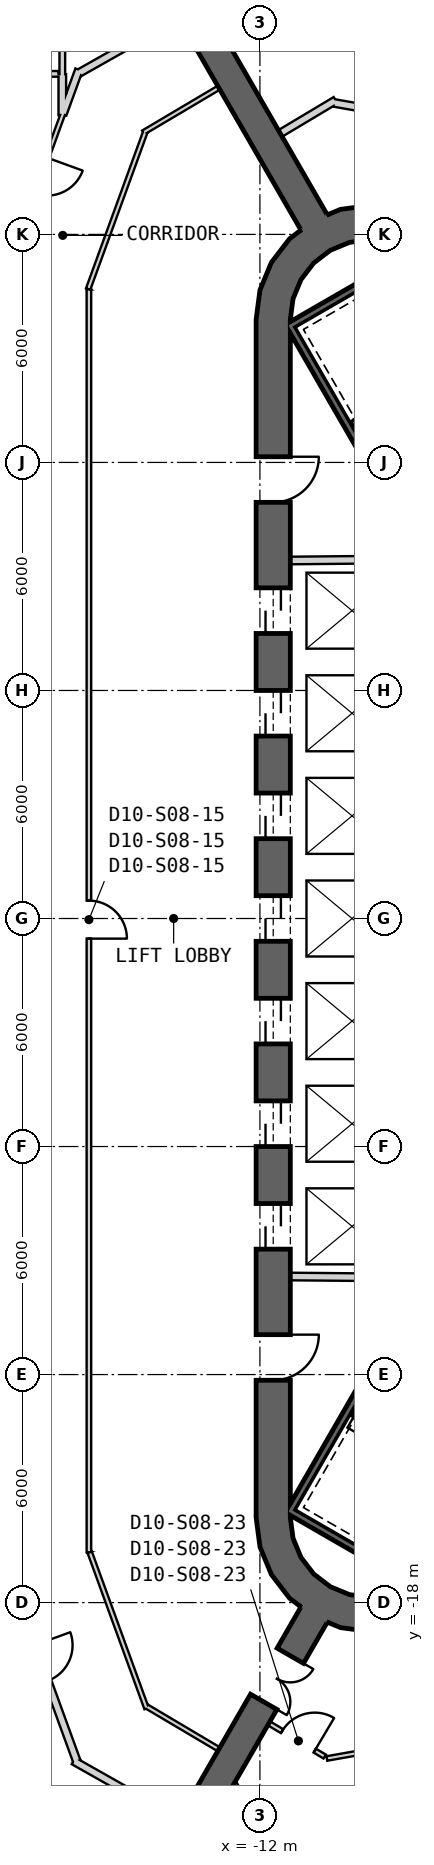
"""IFC4 building model, lengths in metres.
Left out: names, types, materials, properties, quantities, classifications, styles, units other than length and angle.
Written with IfcOpenShell. Run it as: python <this file> out.ifc"""

import sys

from ifc_helpers import new_model, si_unit, direction, frame, frame_2d, origin, place, context, subcontext, project, spatial, polyline, rectangle, outline, extrude, element, fill, save


model = new_model("IFC4")
c1 = context("Model", 3, precision=1e-05, world=origin(), true_north=direction((0.0, 1.0)))
c2 = subcontext(c1, "Body", "Model", "MODEL_VIEW")
j1 = project(units=[si_unit("LENGTHUNIT", "METRE"), si_unit("PLANEANGLEUNIT", "RADIAN")], contexts=[c1])
p1 = place(None, origin())
s1 = spatial("IfcSite", under=j1, at=p1, CompositionType="ELEMENT")
p2 = place(p1, origin())
s2 = spatial("IfcBuilding", under=s1, at=p2, CompositionType="ELEMENT")
p3 = place(p2, frame((0.0, 0.0, 143.9)))
s3 = spatial("IfcBuildingStorey", under=s2, at=p3, CompositionType="ELEMENT", Elevation=143.9)
p4 = place(p3, frame((-11.65, 15.762, 0.0), z_axis=(0.0, 0.0, 1.0), x_axis=(0.0, -1.0, 0.0)))
e1 = element("IfcWall", 1, at=p4, inside=s3, PredefinedType="SHEAR", context=c2, shape_type="SweptSolid", body=[
    extrude(rectangle(XDim=31.523, YDim=0.9, at=frame_2d((15.762, 0.0))), origin(), (0.0, 0.0, 1.0), 4.1),
])
p5 = place(p4, frame((7.062, 0.0, 0.0)))
e2 = element("IfcOpeningElement", 2, at=p5, cuts=e1, PredefinedType="OPENING", context=c2, shape_type="SweptSolid", body=[
    extrude(rectangle(XDim=1.2, YDim=2.4, at=frame_2d((0.6, 1.2))), frame((0.0, 0.46, 0.0), z_axis=(0.0, -1.0, 0.0), x_axis=(1.0, 0.0, 0.0)), (0.0, 0.0, 1.0), 0.92),
])
p6 = place(p4, frame((9.762, 0.0, 0.0)))
e3 = element("IfcOpeningElement", 3, at=p6, cuts=e1, PredefinedType="OPENING", context=c2, shape_type="SweptSolid", body=[
    extrude(rectangle(XDim=1.2, YDim=2.4, at=frame_2d((0.6, 1.2))), frame((0.0, 0.46, 0.0), z_axis=(0.0, -1.0, 0.0), x_axis=(1.0, 0.0, 0.0)), (0.0, 0.0, 1.0), 0.92),
])
p7 = place(p4, frame((12.462, 0.0, 0.0)))
e4 = element("IfcOpeningElement", 4, at=p7, cuts=e1, PredefinedType="OPENING", context=c2, shape_type="SweptSolid", body=[
    extrude(rectangle(XDim=1.2, YDim=2.4, at=frame_2d((0.6, 1.2))), frame((0.0, 0.46, 0.0), z_axis=(0.0, -1.0, 0.0), x_axis=(1.0, 0.0, 0.0)), (0.0, 0.0, 1.0), 0.92),
])
p8 = place(p4, frame((15.162, 0.0, 0.0)))
e5 = element("IfcOpeningElement", 5, at=p8, cuts=e1, PredefinedType="OPENING", context=c2, shape_type="SweptSolid", body=[
    extrude(rectangle(XDim=1.2, YDim=2.4, at=frame_2d((0.6, 1.2))), frame((0.0, 0.46, 0.0), z_axis=(0.0, -1.0, 0.0), x_axis=(1.0, 0.0, 0.0)), (0.0, 0.0, 1.0), 0.92),
])
p9 = place(p4, frame((17.862, 0.0, 0.0)))
e6 = element("IfcOpeningElement", 6, at=p9, cuts=e1, PredefinedType="OPENING", context=c2, shape_type="SweptSolid", body=[
    extrude(rectangle(XDim=1.2, YDim=2.4, at=frame_2d((0.6, 1.2))), frame((0.0, 0.46, 0.0), z_axis=(0.0, -1.0, 0.0), x_axis=(1.0, 0.0, 0.0)), (0.0, 0.0, 1.0), 0.92),
])
p10 = place(p4, frame((20.562, 0.0, 0.0)))
e7 = element("IfcOpeningElement", 7, at=p10, cuts=e1, PredefinedType="OPENING", context=c2, shape_type="SweptSolid", body=[
    extrude(rectangle(XDim=1.2, YDim=2.4, at=frame_2d((0.6, 1.2))), frame((0.0, 0.46, 0.0), z_axis=(0.0, -1.0, 0.0), x_axis=(1.0, 0.0, 0.0)), (0.0, 0.0, 1.0), 0.92),
])
p11 = place(p4, frame((23.262, 0.0, 0.0)))
e8 = element("IfcOpeningElement", 8, at=p11, cuts=e1, PredefinedType="OPENING", context=c2, shape_type="SweptSolid", body=[
    extrude(rectangle(XDim=1.2, YDim=2.4, at=frame_2d((0.6, 1.2))), frame((0.0, 0.46, 0.0), z_axis=(0.0, -1.0, 0.0), x_axis=(1.0, 0.0, 0.0)), (0.0, 0.0, 1.0), 0.92),
])
p12 = place(p4, frame((3.612, 0.0, 0.0)))
e9 = element("IfcOpeningElement", 9, at=p12, cuts=e1, PredefinedType="OPENING", context=c2, shape_type="SweptSolid", body=[
    extrude(rectangle(XDim=1.2, YDim=2.4, at=frame_2d((0.6, 1.2))), frame((0.0, 0.46, 0.0), z_axis=(0.0, -1.0, 0.0), x_axis=(1.0, 0.0, 0.0)), (0.0, 0.0, 1.0), 0.92),
])
p13 = place(p4, frame((26.712, 0.0, 0.0)))
e10 = element("IfcOpeningElement", 10, at=p13, cuts=e1, PredefinedType="OPENING", context=c2, shape_type="SweptSolid", body=[
    extrude(rectangle(XDim=1.2, YDim=2.4, at=frame_2d((0.6, 1.2))), frame((0.0, 0.46, 0.0), z_axis=(0.0, -1.0, 0.0), x_axis=(1.0, 0.0, 0.0)), (0.0, 0.0, 1.0), 0.92),
])
p14 = place(p3, origin())
e11 = element("IfcWall", 11, at=p14, inside=s3, PredefinedType="SHEAR", context=c2, shape_type="SweptSolid", body=[
    extrude(outline(polyline([(-7.6, 18.36), (-8.323, 18.659), (-9.1, 18.762), (-9.876, 18.659), (-10.6, 18.36), (-11.221, 17.883), (-11.698, 17.262), (-11.998, 16.538), (-12.1, 15.762), (-11.2, 15.762), (-11.128, 16.305), (-10.919, 16.812), (-10.585, 17.247), (-10.15, 17.58), (-9.644, 17.79), (-9.1, 17.862), (-8.556, 17.79), (-8.05, 17.58), (-7.6, 18.36)])), origin(), (0.0, 0.0, 1.0), 4.1),
])
p15 = place(p3, origin())
e12 = element("IfcWall", 12, at=p15, inside=s3, PredefinedType="SHEAR", context=c2, shape_type="SweptSolid", body=[
    extrude(outline(polyline([(-12.1, -15.762), (-11.998, -16.538), (-11.698, -17.262), (-11.221, -17.883), (-10.6, -18.36), (-9.876, -18.659), (-9.1, -18.762), (-8.323, -18.659), (-7.6, -18.36), (-8.05, -17.58), (-8.556, -17.79), (-9.1, -17.862), (-9.644, -17.79), (-10.15, -17.58), (-10.585, -17.247), (-10.919, -16.812), (-11.128, -16.305), (-11.2, -15.762), (-12.1, -15.762)])), origin(), (0.0, 0.0, 1.0), 4.1),
])
p16 = place(p3, frame((-10.575, 18.316, 0.0), z_axis=(0.0, 0.0, 1.0), x_axis=(-0.500002326941, 0.86602406032, 0.0)))
e13 = element("IfcWall", 13, at=p16, inside=s3, PredefinedType="SHEAR", context=c2, shape_type="SweptSolid", body=[
    extrude(rectangle(XDim=12.384, YDim=0.8, at=frame_2d((6.192, 0.0))), origin(), (0.0, 0.0, 1.0), 4.1),
])
p17 = place(p16, frame((6.95, 0.0, 0.0)))
e14 = element("IfcOpeningElement", 14, at=p17, cuts=e13, PredefinedType="OPENING", context=c2, shape_type="SweptSolid", body=[
    extrude(rectangle(XDim=1.4, YDim=2.4, at=frame_2d((0.7, 1.2))), frame((0.0, 0.41, 0.0), z_axis=(0.0, -1.0, 0.0), x_axis=(1.0, 0.0, 0.0)), (0.0, 0.0, 1.0), 0.82),
])
p18 = place(p3, frame((-10.575, -18.316, 0.0), z_axis=(0.0, 0.0, 1.0), x_axis=(-0.500002326941, -0.86602406032, 0.0)))
e15 = element("IfcWall", 15, at=p18, inside=s3, PredefinedType="SHEAR", context=c2, shape_type="SweptSolid", body=[
    extrude(rectangle(XDim=12.384, YDim=0.8, at=frame_2d((6.192, 0.0))), origin(), (0.0, 0.0, 1.0), 4.1),
])
p19 = place(p18, frame((1.25, 0.0, 0.0)))
e16 = element("IfcOpeningElement", 16, at=p19, cuts=e15, PredefinedType="OPENING", context=c2, shape_type="SweptSolid", body=[
    extrude(rectangle(XDim=1.4, YDim=2.4, at=frame_2d((0.7, 1.2))), frame((0.0, 0.41, 0.0), z_axis=(0.0, -1.0, 0.0), x_axis=(1.0, 0.0, 0.0)), (0.0, 0.0, 1.0), 0.82),
])
p20 = place(p3, frame((-11.2, 9.42, 0.0), z_axis=(0.0, 0.0, 1.0), x_axis=(0.999957167047, 0.009255488683, 0.0)))
e17 = element("IfcWall", 17, at=p20, inside=s3, PredefinedType="PLUMBINGWALL", context=c2, shape_type="SweptSolid", body=[
    extrude(rectangle(XDim=3.35, YDim=0.2, at=frame_2d((1.675, 0.0))), origin(), (0.0, 0.0, 1.0), 3.8),
])
p21 = place(p3, frame((-8.05, -9.449, 0.0), z_axis=(0.0, 0.0, 1.0), x_axis=(-0.999957467379, 0.009222983926, 0.0)))
e18 = element("IfcWall", 18, at=p21, inside=s3, PredefinedType="PLUMBINGWALL", context=c2, shape_type="SweptSolid", body=[
    extrude(rectangle(XDim=3.15, YDim=0.2, at=frame_2d((1.575, 0.0))), origin(), (0.0, 0.0, 1.0), 3.8),
])
p22 = place(p3, frame((-11.245, 15.678, -0.3), z_axis=(0.0, 0.0, 1.0), x_axis=(0.499977274689, -0.866038523851, 0.0)))
e19 = element("IfcWall", 19, at=p22, inside=s3, PredefinedType="SHEAR", context=c2, shape_type="SweptSolid", body=[
    extrude(rectangle(XDim=8.1, YDim=0.2, at=frame_2d((4.05, 0.0))), origin(), (0.0, 0.0, 1.0), 4.1),
])
for number, where, z_axis, x_axis in (
    (20, (-7.818, 17.541, -0.3), (0.0, 0.0, 1.0), (-0.866, -0.5, 0.0)),
    (21, (-11.282, -15.541, -0.3), (0.0, 0.0, 1.0), (0.866, -0.5, 0.0)),
):
    element("IfcWall", number, at=place(p3, frame(where, z_axis=z_axis, x_axis=x_axis)), inside=s3, PredefinedType="SHEAR", context=c2, shape_type="SweptSolid", body=[
        extrude(rectangle(XDim=3.8, YDim=0.2, at=frame_2d((1.9, 0.0))), origin(), (0.0, 0.0, 1.0), 4.1),
    ])
p23 = place(p3, frame((-7.196, -8.663, -0.3), z_axis=(0.0, 0.0, 1.0), x_axis=(-0.499997992926, -0.866026562566, 0.0)))
e22 = element("IfcWall", 22, at=p23, inside=s3, PredefinedType="SHEAR", context=c2, shape_type="SweptSolid", body=[
    extrude(rectangle(XDim=7.9, YDim=0.2, at=frame_2d((3.95, 0.0))), origin(), (0.0, 0.0, 1.0), 4.1),
])
p24 = place(p3, frame((-13.082, 21.859, 0.0), z_axis=(0.0, 0.0, 1.0), x_axis=(-0.860286384661, -0.509811079095, 0.0)))
e23 = element("IfcWall", 23, at=p24, inside=s3, PredefinedType="PARTITIONING", context=c2, shape_type="SweptSolid", body=[
    extrude(rectangle(XDim=2.311, YDim=0.12, at=frame_2d((1.155, 0.0))), origin(), (0.0, 0.0, 1.0), 3.8),
])
p25 = place(p3, frame((-15.017, 20.692, 0.0), z_axis=(0.0, 0.0, 1.0), x_axis=(-0.342028368186, -0.939689627141, 0.0)))
e24 = element("IfcWall", 24, at=p25, inside=s3, PredefinedType="PARTITIONING", context=c2, shape_type="SweptSolid", body=[
    extrude(rectangle(XDim=4.397, YDim=0.12, at=frame_2d((2.198, 0.0))), origin(), (0.0, 0.0, 1.0), 2.88),
])
p26 = place(p3, frame((-16.5, 16.557, 0.0), z_axis=(0.0, 0.0, 1.0), x_axis=(0.0, -1.0, 0.0)))
e25 = element("IfcWall", 25, at=p26, inside=s3, PredefinedType="PARTITIONING", context=c2, shape_type="SweptSolid", body=[
    extrude(rectangle(XDim=33.234, YDim=0.12, at=frame_2d((16.617, 0.0))), origin(), (0.0, 0.0, 1.0), 2.98),
])
p27 = place(p26, frame((16.087, 0.0, 0.0)))
e26 = element("IfcOpeningElement", 26, at=p27, cuts=e25, PredefinedType="OPENING", context=c2, shape_type="SweptSolid", body=[
    extrude(rectangle(XDim=1.0, YDim=2.1, at=frame_2d((0.5, 1.05))), frame((0.0, 0.07, 0.0), z_axis=(0.0, -1.0, 0.0), x_axis=(1.0, 0.0, 0.0)), (0.0, 0.0, 1.0), 0.14),
])
p28 = place(p3, frame((-16.479, -16.673, 0.0), z_axis=(0.0, 0.0, 1.0), x_axis=(0.342025144217, -0.939690800595, 0.0)))
e27 = element("IfcWall", 27, at=p28, inside=s3, PredefinedType="PARTITIONING", context=c2, shape_type="SweptSolid", body=[
    extrude(rectangle(XDim=4.378, YDim=0.12, at=frame_2d((2.189, 0.0))), origin(), (0.0, 0.0, 1.0), 2.88),
])
p29 = place(p3, frame((-14.983, -20.732, 0.0), z_axis=(0.0, 0.0, 1.0), x_axis=(0.860268204019, -0.509841756973, 0.0)))
e28 = element("IfcWall", 28, at=p29, inside=s3, PredefinedType="PARTITIONING", context=c2, shape_type="SweptSolid", body=[
    extrude(rectangle(XDim=2.21, YDim=0.12, at=frame_2d((1.105, 0.0))), origin(), (0.0, 0.0, 1.0), 3.8),
])
p30 = place(p3, frame((-16.903, -22.166, 0.0), z_axis=(0.0, 0.0, 1.0), x_axis=(0.870335069356, -0.492460015686, 0.0)))
e29 = element("IfcWall", 29, at=p30, inside=s3, PredefinedType="PARTITIONING", context=c2, shape_type="SweptSolid", body=[
    extrude(rectangle(XDim=3.156, YDim=0.2, at=frame_2d((1.578, 0.0))), origin(), (0.0, 0.0, 1.0), 2.88),
])
p31 = place(p3, frame((-18.734, -16.911, 0.0), z_axis=(0.0, 0.0, 1.0), x_axis=(0.342022840992, -0.939691638911, 0.0)))
e30 = element("IfcWall", 30, at=p31, inside=s3, PredefinedType="PARTITIONING", context=c2, shape_type="SweptSolid", body=[
    extrude(rectangle(XDim=5.605, YDim=0.2, at=frame_2d((2.802, 0.0))), origin(), (0.0, 0.0, 1.0), 2.88),
])
p32 = place(p31, frame((2.352, 0.0, 0.0)))
e31 = element("IfcOpeningElement", 31, at=p32, cuts=e30, PredefinedType="OPENING", context=c2, shape_type="SweptSolid", body=[
    extrude(rectangle(XDim=1.0, YDim=2.1, at=frame_2d((0.5, 1.05))), frame((0.0, 0.11, 0.0), z_axis=(0.0, -1.0, 0.0), x_axis=(1.0, 0.0, 0.0)), (0.0, 0.0, 1.0), 0.22),
])
p33 = place(p3, frame((-16.76, 22.333, 0.0), z_axis=(0.0, 0.0, 1.0), x_axis=(-0.342041387985, -0.93968488809, 0.0)))
e32 = element("IfcWall", 32, at=p33, inside=s3, PredefinedType="PARTITIONING", context=c2, shape_type="SweptSolid", body=[
    extrude(rectangle(XDim=1.248, YDim=0.2, at=frame_2d((0.624, 0.0))), origin(), (0.0, 0.0, 1.0), 2.88),
])
p34 = place(p3, frame((-14.156, 23.719, 0.0), z_axis=(0.0, 0.0, 1.0), x_axis=(-0.870320915518, -0.492485029226, 0.0)))
e33 = element("IfcWall", 33, at=p34, inside=s3, PredefinedType="PARTITIONING", context=c2, shape_type="SweptSolid", body=[
    extrude(rectangle(XDim=2.99, YDim=0.2, at=frame_2d((1.495, 0.0))), origin(), (0.0, 0.0, 1.0), 2.88),
])
p35 = place(p3, frame((-17.188, 21.16, 0.0), z_axis=(0.0, 0.0, 1.0), x_axis=(-0.342046352126, -0.939683081149, 0.0)))
e34 = element("IfcWall", 34, at=p35, inside=s3, PredefinedType="PARTITIONING", context=c2, shape_type="SweptSolid", body=[
    extrude(rectangle(XDim=3.425, YDim=0.12, at=frame_2d((1.713, 0.0))), origin(), (0.0, 0.0, 1.0), 2.98),
])
p36 = place(p35, frame((1.213, 0.0, 0.0)))
e35 = element("IfcOpeningElement", 35, at=p36, cuts=e34, PredefinedType="OPENING", context=c2, shape_type="SweptSolid", body=[
    extrude(rectangle(XDim=1.0, YDim=2.1, at=frame_2d((0.5, 1.05))), frame((0.0, 0.07, 0.0), z_axis=(0.0, -1.0, 0.0), x_axis=(1.0, 0.0, 0.0)), (0.0, 0.0, 1.0), 0.14),
])
p37 = place(p3, frame((-10.007, 21.529, 0.0), z_axis=(0.0, 0.0, 1.0), x_axis=(-0.858379714818, -0.513014878136, 0.0)))
e36 = element("IfcWall", 36, at=p37, inside=s3, PredefinedType="PARTITIONING", context=c2, shape_type="SweptSolid", body=[
    extrude(rectangle(XDim=1.698, YDim=0.2, at=frame_2d((0.849, 0.0))), origin(), (0.0, 0.0, 1.0), 3.8),
])
p38 = place(p3, frame((-6.667, 20.863, 0.0), z_axis=(0.0, 0.0, 1.0), x_axis=(-0.984817805596, 0.173591156977, 0.0)))
e37 = element("IfcWall", 37, at=p38, inside=s3, PredefinedType="PARTITIONING", context=c2, shape_type="SweptSolid", body=[
    extrude(rectangle(XDim=3.443, YDim=0.2, at=frame_2d((1.721, 0.0))), origin(), (0.0, 0.0, 1.0), 2.88),
])
p39 = place(p3, frame((-10.239, -22.102, 0.0), z_axis=(0.0, 0.0, 1.0), x_axis=(0.984801523662, 0.173683502361, 0.0)))
e38 = element("IfcWall", 38, at=p39, inside=s3, PredefinedType="PARTITIONING", context=c2, shape_type="SweptSolid", body=[
    extrude(rectangle(XDim=1.368, YDim=0.12, at=frame_2d((0.684, 0.0))), origin(), (0.0, 0.0, 1.0), 2.88),
])
p40 = place(p3, frame((-11.764, -21.177, 0.0), z_axis=(0.0, 0.0, 1.0), x_axis=(0.859089516353, -0.511825363667, 0.0)))
e39 = element("IfcWall", 39, at=p40, inside=s3, PredefinedType="PARTITIONING", context=c2, shape_type="SweptSolid", body=[
    extrude(rectangle(XDim=1.709, YDim=0.12, at=frame_2d((0.854, 0.0))), origin(), (0.0, 0.0, 1.0), 3.8),
])
p41 = place(p40, frame((0.405, 0.0, 0.0)))
e40 = element("IfcOpeningElement", 40, at=p41, cuts=e39, PredefinedType="OPENING", context=c2, shape_type="SweptSolid", body=[
    extrude(rectangle(XDim=1.0, YDim=2.1, at=frame_2d((0.5, 1.05))), frame((0.0, 0.07, 0.0), z_axis=(0.0, -1.0, 0.0), x_axis=(1.0, 0.0, 0.0)), (0.0, 0.0, 1.0), 0.14),
])
p42 = place(p3, frame((-17.2, 21.141, 0.0), z_axis=(0.0, 0.0, 1.0), x_axis=(0.0, 1.0, 0.0)))
e41 = element("IfcWall", 41, at=p42, inside=s3, PredefinedType="PARTITIONING", context=c2, shape_type="SweptSolid", body=[
    extrude(rectangle(XDim=1.075, YDim=0.2, at=frame_2d((0.538, 0.0))), origin(), (0.0, 0.0, 1.0), 2.88),
])
p43 = place(p3, frame((-17.2, 22.217, 0.0), z_axis=(0.0, 0.0, 1.0), x_axis=(0.0, 1.0, 0.0)))
e42 = element("IfcWall", 42, at=p43, inside=s3, PredefinedType="PLUMBINGWALL", context=c2, shape_type="SweptSolid", body=[
    extrude(rectangle(XDim=3.259, YDim=0.15, at=frame_2d((1.629, 0.0))), origin(), (0.0, 0.0, 1.0), 2.88),
])
p44 = place(p3, frame((-17.3, 22.224, 0.0), z_axis=(0.0, 0.0, 1.0), x_axis=(-1.0, 0.0, 0.0)))
e43 = element("IfcWall", 43, at=p44, inside=s3, PredefinedType="PLUMBINGWALL", context=c2, shape_type="SweptSolid", body=[
    extrude(rectangle(XDim=6.03, YDim=0.15, at=frame_2d((3.015, 0.0))), origin(), (0.0, 0.0, 1.0), 3.8),
])
p45 = place(p3, frame((-12.673, -22.75, 0.0), z_axis=(0.0, 0.0, 1.0), x_axis=(0.504751362892, -0.863264769152, 0.0)))
e44 = element("IfcWall", 44, at=p45, inside=s3, PredefinedType="PARTITIONING", context=c2, shape_type="SweptSolid", body=[
    extrude(rectangle(XDim=5.775, YDim=0.12, at=frame_2d((2.887, 0.0))), origin(), (0.0, 0.0, 1.0), 2.88),
])
p46 = place(p27, origin())
e45 = element("IfcDoor", 45, at=p46, inside=s3, OperationType="SINGLE_SWING_RIGHT", PredefinedType="NOTDEFINED", context=c2, shape_type="SweptSolid", body=[
    extrude(rectangle(XDim=1.0, YDim=2.1, at=frame_2d((0.5, 1.05))), frame((0.0, 0.025, 0.0), z_axis=(0.0, -1.0, 0.0), x_axis=(1.0, 0.0, 0.0)), (0.0, 0.0, 1.0), 0.05),
])
fill(e26, e45)
p47 = place(p41, origin())
e46 = element("IfcDoor", 46, at=p47, inside=s3, OperationType="SINGLE_SWING_LEFT", PredefinedType="NOTDEFINED", context=c2, shape_type="SweptSolid", body=[
    extrude(rectangle(XDim=1.0, YDim=2.1, at=frame_2d((0.5, 1.05))), frame((0.0, 0.025, 0.0), z_axis=(0.0, -1.0, 0.0), x_axis=(1.0, 0.0, 0.0)), (0.0, 0.0, 1.0), 0.05),
])
fill(e40, e46)
p48 = place(p5, origin())
e47 = element("IfcDoor", 47, at=p48, inside=s3, OperationType="SLIDING_TO_LEFT", PredefinedType="USERDEFINED", context=c2, shape_type="SweptSolid", body=[
    extrude(rectangle(XDim=1.2, YDim=2.4, at=frame_2d((0.6, 1.2))), frame((0.0, 0.025, 0.0), z_axis=(0.0, -1.0, 0.0), x_axis=(1.0, 0.0, 0.0)), (0.0, 0.0, 1.0), 0.05),
])
fill(e2, e47)
p49 = place(p6, origin())
e48 = element("IfcDoor", 48, at=p49, inside=s3, OperationType="SLIDING_TO_LEFT", PredefinedType="USERDEFINED", context=c2, shape_type="SweptSolid", body=[
    extrude(rectangle(XDim=1.2, YDim=2.4, at=frame_2d((0.6, 1.2))), frame((0.0, 0.025, 0.0), z_axis=(0.0, -1.0, 0.0), x_axis=(1.0, 0.0, 0.0)), (0.0, 0.0, 1.0), 0.05),
])
fill(e3, e48)
p50 = place(p7, origin())
e49 = element("IfcDoor", 49, at=p50, inside=s3, OperationType="SLIDING_TO_LEFT", PredefinedType="USERDEFINED", context=c2, shape_type="SweptSolid", body=[
    extrude(rectangle(XDim=1.2, YDim=2.4, at=frame_2d((0.6, 1.2))), frame((0.0, 0.025, 0.0), z_axis=(0.0, -1.0, 0.0), x_axis=(1.0, 0.0, 0.0)), (0.0, 0.0, 1.0), 0.05),
])
fill(e4, e49)
p51 = place(p8, origin())
e50 = element("IfcDoor", 50, at=p51, inside=s3, OperationType="SLIDING_TO_LEFT", PredefinedType="USERDEFINED", context=c2, shape_type="SweptSolid", body=[
    extrude(rectangle(XDim=1.2, YDim=2.4, at=frame_2d((0.6, 1.2))), frame((0.0, 0.025, 0.0), z_axis=(0.0, -1.0, 0.0), x_axis=(1.0, 0.0, 0.0)), (0.0, 0.0, 1.0), 0.05),
])
fill(e5, e50)
p52 = place(p9, origin())
e51 = element("IfcDoor", 51, at=p52, inside=s3, OperationType="SLIDING_TO_LEFT", PredefinedType="USERDEFINED", context=c2, shape_type="SweptSolid", body=[
    extrude(rectangle(XDim=1.2, YDim=2.4, at=frame_2d((0.6, 1.2))), frame((0.0, 0.025, 0.0), z_axis=(0.0, -1.0, 0.0), x_axis=(1.0, 0.0, 0.0)), (0.0, 0.0, 1.0), 0.05),
])
fill(e6, e51)
p53 = place(p10, origin())
e52 = element("IfcDoor", 52, at=p53, inside=s3, OperationType="SLIDING_TO_LEFT", PredefinedType="USERDEFINED", context=c2, shape_type="SweptSolid", body=[
    extrude(rectangle(XDim=1.2, YDim=2.4, at=frame_2d((0.6, 1.2))), frame((0.0, 0.025, 0.0), z_axis=(0.0, -1.0, 0.0), x_axis=(1.0, 0.0, 0.0)), (0.0, 0.0, 1.0), 0.05),
])
fill(e7, e52)
p54 = place(p11, origin())
e53 = element("IfcDoor", 53, at=p54, inside=s3, OperationType="SLIDING_TO_LEFT", PredefinedType="USERDEFINED", context=c2, shape_type="SweptSolid", body=[
    extrude(rectangle(XDim=1.2, YDim=2.4, at=frame_2d((0.6, 1.2))), frame((0.0, 0.025, 0.0), z_axis=(0.0, -1.0, 0.0), x_axis=(1.0, 0.0, 0.0)), (0.0, 0.0, 1.0), 0.05),
])
fill(e8, e53)
p55 = place(p12, origin())
e54 = element("IfcDoor", 54, at=p55, inside=s3, OperationType="SINGLE_SWING_LEFT", PredefinedType="USERDEFINED", context=c2, shape_type="SweptSolid", body=[
    extrude(rectangle(XDim=1.2, YDim=2.4, at=frame_2d((0.6, 1.2))), frame((0.0, 0.025, 0.0), z_axis=(0.0, -1.0, 0.0), x_axis=(1.0, 0.0, 0.0)), (0.0, 0.0, 1.0), 0.05),
])
fill(e9, e54)
p56 = place(p13, origin())
e55 = element("IfcDoor", 55, at=p56, inside=s3, OperationType="SINGLE_SWING_RIGHT", PredefinedType="USERDEFINED", context=c2, shape_type="SweptSolid", body=[
    extrude(rectangle(XDim=1.2, YDim=2.4, at=frame_2d((0.6, 1.2))), frame((0.0, 0.025, 0.0), z_axis=(0.0, -1.0, 0.0), x_axis=(1.0, 0.0, 0.0)), (0.0, 0.0, 1.0), 0.05),
])
fill(e10, e55)
p57 = place(p19, origin())
e56 = element("IfcDoor", 56, at=p57, inside=s3, OperationType="DOUBLE_DOOR_SINGLE_SWING", PredefinedType="NOTDEFINED", context=c2, shape_type="SweptSolid", body=[
    extrude(rectangle(XDim=1.4, YDim=2.4, at=frame_2d((0.7, 1.2))), frame((0.0, 0.025, 0.0), z_axis=(0.0, -1.0, 0.0), x_axis=(1.0, 0.0, 0.0)), (0.0, 0.0, 1.0), 0.05),
])
fill(e16, e56)
save(model, sys.argv[1])
